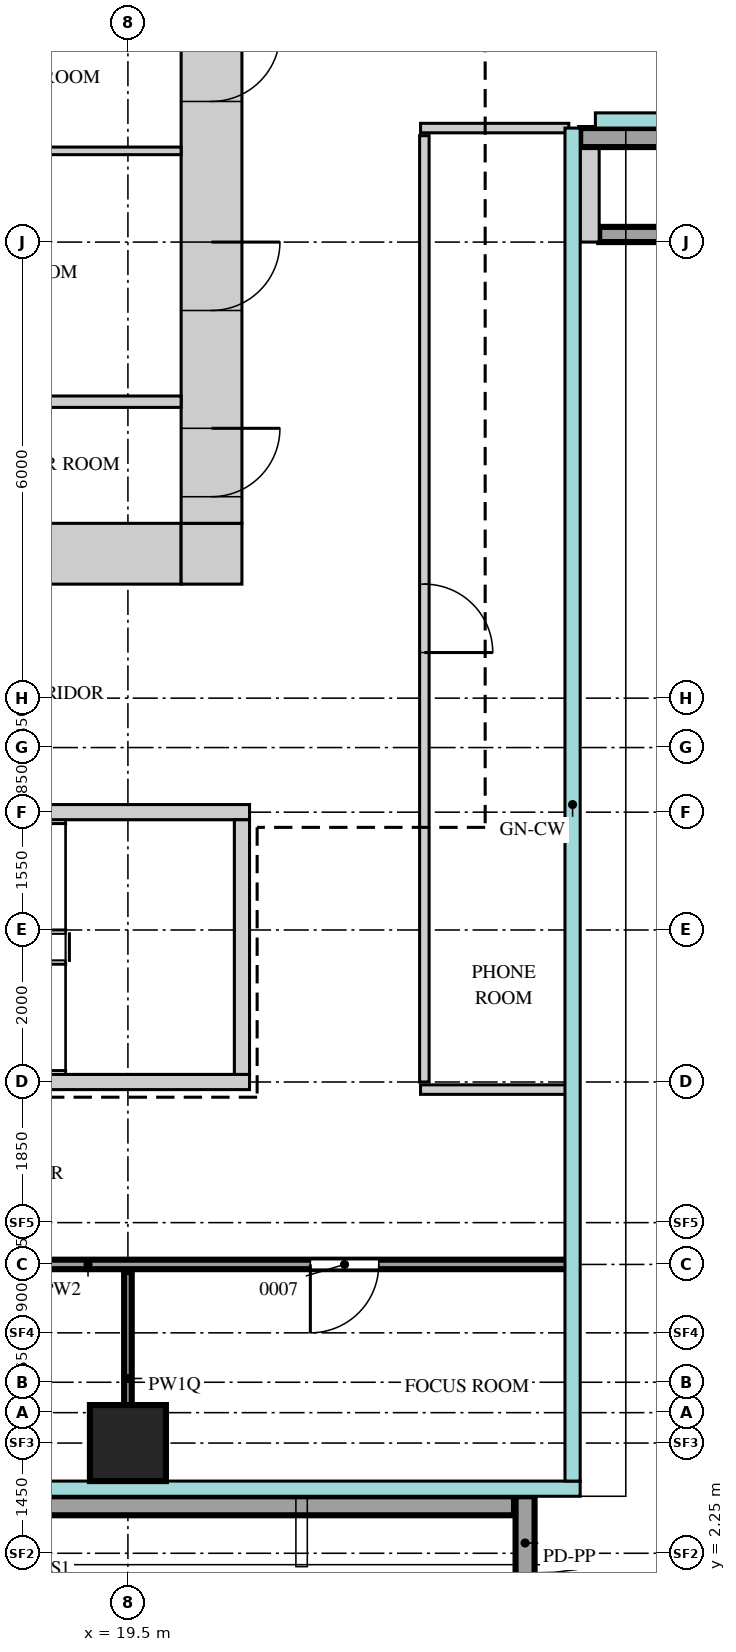
"""IFC4 building model, lengths in metres.
Left out: names, types, materials, properties, quantities, classifications, styles, units other than length and angle.
Written with IfcOpenShell. Run it as: python <this file> out.ifc"""

import sys

from ifc_helpers import new_model, si_unit, direction, frame, frame_2d, origin, origin_2d, place, context, subcontext, project, spatial, rectangle, extrude, source, transform, mapped, element, fill, save


model = new_model("IFC4")
c1 = context("Model", 3, precision=1e-05, world=origin(), true_north=direction((0.0, 1.0)))
c2 = subcontext(c1, "Body", "Model", "MODEL_VIEW")
j1 = project(units=[si_unit("LENGTHUNIT", "METRE"), si_unit("PLANEANGLEUNIT", "RADIAN")], contexts=[c1])
p1 = place(None, origin())
s1 = spatial("IfcSite", under=j1, at=p1, CompositionType="ELEMENT")
p2 = place(p1, origin())
s2 = spatial("IfcBuilding", under=s1, at=p2, CompositionType="ELEMENT")
p3 = place(p2, frame((0.0, 0.0, 164.7)))
s3 = spatial("IfcBuildingStorey", under=s2, at=p3, CompositionType="ELEMENT", Elevation=164.7)
m1 = source(origin(), c2, "Body", "SweptSolid", [
    extrude(rectangle(XDim=13.4, YDim=0.8, at=frame_2d((6.7, 0.0))), origin(), (0.0, 0.0, 1.0), 3.75),
])
p4 = place(p3, frame((6.8, 15.4, 0.0), z_axis=(0.0, 0.0, 1.0), x_axis=(1.0, 0.0, 0.0)))
e1 = element("IfcWall", 1, at=p4, inside=s3, PredefinedType="SHEAR", context=c2, shape_type="MappedRepresentation", body=[
    mapped(m1, transform((0.0, 0.0, 0.0))),
])
m2 = source(origin(), c2, "Body", "SweptSolid", [
    extrude(rectangle(XDim=1.2, YDim=2.1, at=frame_2d((0.6, 1.05))), frame((0.0, 0.41, 0.0), z_axis=(0.0, -1.0, 0.0), x_axis=(1.0, 0.0, 0.0)), (0.0, 0.0, 1.0), 0.82),
])
p5 = place(p4, frame((5.4, 0.0, 0.0)))
e2 = element("IfcOpeningElement", 2, at=p5, cuts=e1, PredefinedType="OPENING", context=c2, shape_type="MappedRepresentation", body=[
    mapped(m2, transform((0.0, 0.0, 0.0))),
])
p6 = place(p4, frame((2.05, 0.0, 0.0)))
e3 = element("IfcOpeningElement", 3, at=p6, cuts=e1, PredefinedType="OPENING", context=c2, shape_type="MappedRepresentation", body=[
    mapped(m2, transform((0.0, 0.0, 0.0))),
])
m3 = source(origin(), c2, "Body", "SweptSolid", [
    extrude(rectangle(XDim=1.0, YDim=2.1, at=frame_2d((0.5, 1.05))), frame((0.0, 0.41, 0.0), z_axis=(0.0, -1.0, 0.0), x_axis=(1.0, 0.0, 0.0)), (0.0, 0.0, 1.0), 0.82),
])
p7 = place(p4, frame((7.9, 0.0, 0.0)))
e4 = element("IfcOpeningElement", 4, at=p7, cuts=e1, PredefinedType="OPENING", context=c2, shape_type="MappedRepresentation", body=[
    mapped(m3, transform((0.0, 0.0, 0.0))),
])
m4 = source(origin(), c2, "Body", "SweptSolid", [
    extrude(rectangle(XDim=0.8, YDim=0.8, at=frame_2d((0.4, 0.0))), origin(), (0.0, 0.0, 1.0), 3.75),
])
p8 = place(p3, frame((20.2, 15.4, 0.0), z_axis=(0.0, 0.0, 1.0), x_axis=(1.0, 0.0, 0.0)))
e5 = element("IfcWall", 5, at=p8, inside=s3, PredefinedType="SHEAR", context=c2, shape_type="MappedRepresentation", body=[
    mapped(m4, transform((0.0, 0.0, 0.0))),
])
m5 = source(origin(), c2, "Body", "SweptSolid", [
    extrude(rectangle(XDim=22.4, YDim=0.8, at=frame_2d((11.2, 0.0))), origin(), (0.0, 0.0, 1.0), 3.75),
])
p9 = place(p3, frame((20.6, 15.8, 0.0), z_axis=(0.0, 0.0, 1.0), x_axis=(0.0, 1.0, 0.0)))
e6 = element("IfcWall", 6, at=p9, inside=s3, PredefinedType="SHEAR", context=c2, shape_type="MappedRepresentation", body=[
    mapped(m5, transform((0.0, 0.0, 0.0))),
])
m6 = source(origin(), c2, "Body", "SweptSolid", [
    extrude(rectangle(XDim=1.8, YDim=2.1, at=frame_2d((0.9, 1.05))), frame((0.0, 0.41, 0.0), z_axis=(0.0, -1.0, 0.0), x_axis=(1.0, 0.0, 0.0)), (0.0, 0.0, 1.0), 0.82),
])
p10 = place(p9, frame((10.7, 0.0, 0.0)))
e7 = element("IfcOpeningElement", 7, at=p10, cuts=e6, PredefinedType="OPENING", context=c2, shape_type="MappedRepresentation", body=[
    mapped(m6, transform((0.0, 0.0, 0.0))),
])
m7 = source(origin(), c2, "Body", "SweptSolid", [
    extrude(rectangle(XDim=0.9, YDim=2.1, at=frame_2d((0.45, 1.05))), frame((0.0, 0.41, 0.0), z_axis=(0.0, -1.0, 0.0), x_axis=(1.0, 0.0, 0.0)), (0.0, 0.0, 1.0), 0.82),
])
p11 = place(p9, frame((0.35, 0.0, 0.0)))
e8 = element("IfcOpeningElement", 8, at=p11, cuts=e6, PredefinedType="OPENING", context=c2, shape_type="MappedRepresentation", body=[
    mapped(m7, transform((0.0, 0.0, 0.0))),
])
p12 = place(p9, frame((2.8, 0.0, 0.0)))
e9 = element("IfcOpeningElement", 9, at=p12, cuts=e6, PredefinedType="OPENING", context=c2, shape_type="MappedRepresentation", body=[
    mapped(m7, transform((0.0, 0.0, 0.0))),
])
p13 = place(p9, frame((5.55, 0.0, 0.0)))
e10 = element("IfcOpeningElement", 10, at=p13, cuts=e6, PredefinedType="OPENING", context=c2, shape_type="MappedRepresentation", body=[
    mapped(m7, transform((0.0, 0.0, 0.0))),
])
m8 = source(origin(), c2, "Body", "SweptSolid", [
    extrude(rectangle(XDim=7.2, YDim=0.2, at=frame_2d((3.6, 0.0))), origin(), (0.0, 0.0, 1.0), 3.75),
])
p14 = place(p3, frame((13.9, 12.0, 0.0), z_axis=(0.0, 0.0, 1.0), x_axis=(1.0, 0.0, 0.0)))
e11 = element("IfcWall", 11, at=p14, inside=s3, PredefinedType="SHEAR", context=c2, shape_type="MappedRepresentation", body=[
    mapped(m8, transform((0.0, 0.0, 0.0))),
])
p15 = place(p3, frame((13.9, 8.45, 0.0), z_axis=(0.0, 0.0, 1.0), x_axis=(1.0, 0.0, 0.0)))
e12 = element("IfcWall", 12, at=p15, inside=s3, PredefinedType="SHEAR", context=c2, shape_type="MappedRepresentation", body=[
    mapped(m8, transform((0.0, 0.0, 0.0))),
])
m9 = source(origin(), c2, "Body", "SweptSolid", [
    extrude(rectangle(XDim=1.2, YDim=2.1, at=frame_2d((0.6, 1.05))), frame((0.0, 0.11, 0.0), z_axis=(0.0, -1.0, 0.0), x_axis=(1.0, 0.0, 0.0)), (0.0, 0.0, 1.0), 0.22),
])
p16 = place(p15, frame((0.35, 0.0, 0.0)))
e13 = element("IfcOpeningElement", 13, at=p16, cuts=e12, PredefinedType="OPENING", context=c2, shape_type="MappedRepresentation", body=[
    mapped(m9, transform((0.0, 0.0, 0.0))),
])
m10 = source(origin(), c2, "Body", "SweptSolid", [
    extrude(rectangle(XDim=3.35, YDim=0.2, at=frame_2d((1.675, 0.0))), origin(), (0.0, 0.0, 1.0), 3.75),
])
p17 = place(p3, frame((21.0, 8.55, 0.0), z_axis=(0.0, 0.0, 1.0), x_axis=(0.0, 1.0, 0.0)))
e14 = element("IfcWall", 14, at=p17, inside=s3, PredefinedType="SHEAR", context=c2, shape_type="MappedRepresentation", body=[
    mapped(m10, transform((0.0, 0.0, 0.0))),
])
m11 = source(origin(), c2, "Body", "SweptSolid", [
    extrude(rectangle(XDim=1.0, YDim=1.0, at=origin_2d()), origin(), (0.0, 0.0, 1.0), 3.75),
])
p18 = place(p3, frame((19.5, 3.7, 0.0), z_axis=(0.0, 0.0, 1.0), x_axis=(1.0, 0.0, 0.0)))
e15 = element("IfcColumn", 15, at=p18, inside=s3, PredefinedType="COLUMN", context=c2, shape_type="MappedRepresentation", body=[
    mapped(m11, transform((0.0, 0.0, 0.0))),
])
m12 = source(origin(), c2, "Body", "SweptSolid", [
    extrude(rectangle(XDim=12.6, YDim=0.2, at=frame_2d((6.3, 0.0))), origin(), (0.0, 0.0, 1.0), 1.1),
])
p19 = place(p3, frame((38.3, 19.6, 0.0), z_axis=(0.0, 0.0, 1.0), x_axis=(-1.0, 0.0, 0.0)))
e16 = element("IfcWall", 16, at=p19, inside=s3, PredefinedType="SOLIDWALL", context=c2, shape_type="MappedRepresentation", body=[
    mapped(m12, transform((0.0, 0.0, 0.0))),
])
m13 = source(origin(), c2, "Body", "SweptSolid", [
    extrude(rectangle(XDim=12.83, YDim=0.25, at=frame_2d((6.415, 0.0))), origin(), (0.0, 0.0, 1.0), 1.1),
])
p20 = place(p3, frame((38.28, 20.875, 0.0), z_axis=(0.0, 0.0, 1.0), x_axis=(-1.0, 0.0, 0.0)))
e17 = element("IfcWall", 17, at=p20, inside=s3, PredefinedType="SOLIDWALL", context=c2, shape_type="MappedRepresentation", body=[
    mapped(m13, transform((0.0, 0.0, 0.0))),
])
m14 = source(origin(), c2, "Body", "SweptSolid", [
    extrude(rectangle(XDim=1.23, YDim=0.25, at=frame_2d((0.615, 0.0))), origin(), (0.0, 0.0, 1.0), 1.1),
])
for number, where, z_axis, x_axis in (
    (18, (25.575, 20.73, 0.0), (0.0, 0.0, 1.0), (0.0, -1.0, 0.0)),
    (19, (24.725, 1.77, 0.0), (0.0, 0.0, 1.0), (0.0, 1.0, 0.0)),
):
    element("IfcWall", number, at=place(p3, frame(where, z_axis=z_axis, x_axis=x_axis)), inside=s3, PredefinedType="SOLIDWALL", context=c2, shape_type="MappedRepresentation", body=[
        mapped(m14, transform((0.0, 0.0, 0.0))),
    ])
m15 = source(origin(), c2, "Body", "SweptSolid", [
    extrude(rectangle(XDim=17.08, YDim=0.25, at=frame_2d((8.54, 0.0))), origin(), (0.0, 0.0, 1.0), 1.1),
])
p21 = place(p3, frame((24.58, 2.875, 0.0), z_axis=(0.0, 0.0, 1.0), x_axis=(-1.0, 0.0, 0.0)))
e20 = element("IfcWall", 20, at=p21, inside=s3, PredefinedType="SOLIDWALL", context=c2, shape_type="MappedRepresentation", body=[
    mapped(m15, transform((0.0, 0.0, 0.0))),
])
m16 = source(origin(), c2, "Body", "SweptSolid", [
    extrude(rectangle(XDim=2.8, YDim=0.1, at=frame_2d((1.4, 0.0))), origin(), (0.0, 0.0, 1.0), 3.42),
])
p22 = place(p3, frame((19.5, 3.15, 0.0), z_axis=(0.0, 0.0, 1.0), x_axis=(0.0, 1.0, 0.0)))
e21 = element("IfcWall", 21, at=p22, inside=s3, PredefinedType="PARTITIONING", context=c2, shape_type="MappedRepresentation", body=[
    mapped(m16, transform((0.0, 0.0, 0.0))),
])
m17 = source(origin(), c2, "Body", "SweptSolid", [
    extrude(rectangle(XDim=17.65, YDim=0.125, at=frame_2d((8.825, 0.0))), origin(), (0.0, 0.0, 1.0), 3.8),
])
p23 = place(p3, frame((7.65, 6.05, 0.0), z_axis=(0.0, 0.0, 1.0), x_axis=(1.0, 0.0, 0.0)))
e22 = element("IfcWall", 22, at=p23, inside=s3, PredefinedType="PARTITIONING", context=c2, shape_type="MappedRepresentation", body=[
    mapped(m17, transform((0.0, 0.0, 0.0))),
])
m18 = source(origin(), c2, "Body", "SweptSolid", [
    extrude(rectangle(XDim=0.9, YDim=2.1, at=frame_2d((0.45, 1.05))), frame((0.0, 0.073, 0.0), z_axis=(0.0, -1.0, 0.0), x_axis=(1.0, 0.0, 0.0)), (0.0, 0.0, 1.0), 0.145),
])
p24 = place(p23, frame((2.05, 0.0, 0.0)))
e23 = element("IfcOpeningElement", 23, at=p24, cuts=e22, PredefinedType="OPENING", context=c2, shape_type="MappedRepresentation", body=[
    mapped(m18, transform((0.0, 0.0, 0.0))),
])
p25 = place(p23, frame((7.5, 0.0, 0.0)))
e24 = element("IfcOpeningElement", 24, at=p25, cuts=e22, PredefinedType="OPENING", context=c2, shape_type="MappedRepresentation", body=[
    mapped(m18, transform((0.0, 0.0, 0.0))),
])
p26 = place(p23, frame((14.25, 0.0, 0.0)))
e25 = element("IfcOpeningElement", 25, at=p26, cuts=e22, PredefinedType="OPENING", context=c2, shape_type="MappedRepresentation", body=[
    mapped(m18, transform((0.0, 0.0, 0.0))),
])
m19 = source(origin(), c2, "Body", "SweptSolid", [
    extrude(rectangle(XDim=1.95, YDim=0.125, at=frame_2d((0.975, 0.0))), origin(), (0.0, 0.0, 1.0), 3.8),
])
p27 = place(p3, frame((23.35, 8.35, 0.0), z_axis=(0.0, 0.0, 1.0), x_axis=(1.0, 0.0, 0.0)))
e26 = element("IfcWall", 26, at=p27, inside=s3, PredefinedType="PARTITIONING", context=c2, shape_type="MappedRepresentation", body=[
    mapped(m19, transform((0.0, 0.0, 0.0))),
])
m20 = source(origin(), c2, "Body", "SweptSolid", [
    extrude(rectangle(XDim=12.45, YDim=0.125, at=frame_2d((6.225, 0.0))), origin(), (0.0, 0.0, 1.0), 3.8),
])
p28 = place(p3, frame((23.4, 8.45, 0.0), z_axis=(0.0, 0.0, 1.0), x_axis=(0.0, 1.0, 0.0)))
e27 = element("IfcWall", 27, at=p28, inside=s3, PredefinedType="PARTITIONING", context=c2, shape_type="MappedRepresentation", body=[
    mapped(m20, transform((0.0, 0.0, 0.0))),
])
p29 = place(p28, frame((5.65, 0.0, 0.0)))
e28 = element("IfcOpeningElement", 28, at=p29, cuts=e27, PredefinedType="OPENING", context=c2, shape_type="MappedRepresentation", body=[
    mapped(m18, transform((0.0, 0.0, 0.0))),
])
m21 = source(origin(), c2, "Body", "SweptSolid", [
    extrude(rectangle(XDim=4.0, YDim=0.15, at=frame_2d((2.0, 0.0))), origin(), (0.0, 0.0, 1.0), 3.8),
])
p30 = place(p3, frame((16.2, 17.4, 0.0), z_axis=(0.0, 0.0, 1.0), x_axis=(1.0, 0.0, 0.0)))
e29 = element("IfcWall", 29, at=p30, inside=s3, PredefinedType="PARTITIONING", context=c2, shape_type="MappedRepresentation", body=[
    mapped(m21, transform((0.0, 0.0, 0.0))),
])
m22 = source(origin(), c2, "Body", "SweptSolid", [
    extrude(rectangle(XDim=4.1, YDim=0.1, at=frame_2d((2.05, 0.0))), origin(), (0.0, 0.0, 1.0), 3.8),
])
p31 = place(p3, frame((16.1, 20.7, 0.0), z_axis=(0.0, 0.0, 1.0), x_axis=(1.0, 0.0, 0.0)))
e30 = element("IfcWall", 30, at=p31, inside=s3, PredefinedType="PARTITIONING", context=c2, shape_type="MappedRepresentation", body=[
    mapped(m22, transform((0.0, 0.0, 0.0))),
])
p32 = place(p3, frame((23.35, 21.0, 0.0), z_axis=(0.0, 0.0, 1.0), x_axis=(1.0, 0.0, 0.0)))
e31 = element("IfcWall", 31, at=p32, inside=s3, PredefinedType="PARTITIONING", context=c2, shape_type="MappedRepresentation", body=[
    mapped(m19, transform((0.0, 0.0, 0.0))),
])
m23 = source(origin(), c2, "Body", "SweptSolid", [
    extrude(rectangle(XDim=0.9, YDim=2.1, at=frame_2d((0.45, 1.05))), frame((0.0, 0.35, 0.0), z_axis=(0.0, -1.0, 0.0), x_axis=(1.0, 0.0, 0.0)), (0.0, 0.0, 1.0), 0.7),
])
p33 = place(p11, origin())
e32 = element("IfcDoor", 32, at=p33, inside=s3, OperationType="SINGLE_SWING_RIGHT", PredefinedType="DOOR", context=c2, shape_type="MappedRepresentation", body=[
    mapped(m23, transform((0.0, 0.0, 0.0))),
])
fill(e8, e32)
p34 = place(p12, origin())
e33 = element("IfcDoor", 33, at=p34, inside=s3, OperationType="SINGLE_SWING_RIGHT", PredefinedType="DOOR", context=c2, shape_type="MappedRepresentation", body=[
    mapped(m23, transform((0.0, 0.0, 0.0))),
])
fill(e9, e33)
p35 = place(p13, origin())
e34 = element("IfcDoor", 34, at=p35, inside=s3, OperationType="SINGLE_SWING_RIGHT", PredefinedType="DOOR", context=c2, shape_type="MappedRepresentation", body=[
    mapped(m23, transform((0.0, 0.0, 0.0))),
])
fill(e10, e34)
m24 = source(origin(), c2, "Body", "SweptSolid", [
    extrude(rectangle(XDim=0.9, YDim=2.1, at=frame_2d((0.45, 1.05))), frame((0.0, 0.025, 0.0), z_axis=(0.0, -1.0, 0.0), x_axis=(1.0, 0.0, 0.0)), (0.0, 0.0, 1.0), 0.05),
])
p36 = place(p29, origin())
e35 = element("IfcDoor", 35, at=p36, inside=s3, OperationType="SINGLE_SWING_LEFT", PredefinedType="DOOR", context=c2, shape_type="MappedRepresentation", body=[
    mapped(m24, transform((0.0, 0.0, 0.0))),
])
fill(e28, e35)
p37 = place(p26, origin())
e36 = element("IfcDoor", 36, at=p37, inside=s3, OperationType="SINGLE_SWING_LEFT", PredefinedType="DOOR", context=c2, shape_type="MappedRepresentation", body=[
    mapped(m24, transform((0.0, 0.0, 0.0))),
])
fill(e25, e36)
save(model, sys.argv[1])
